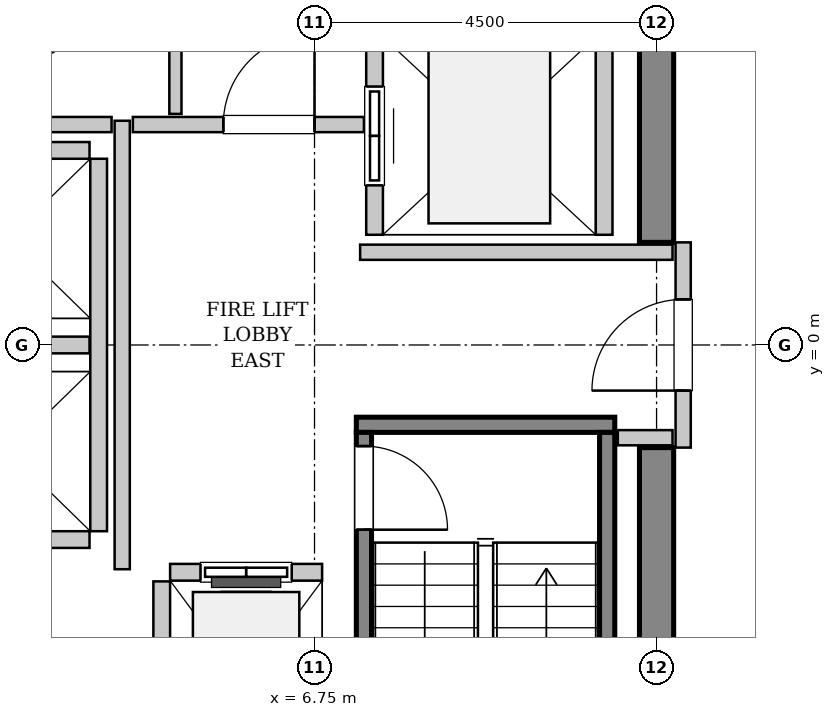
"""IFC4 building model, lengths in metres.
Left out: names, types, materials, properties, quantities, classifications, styles, units other than length and angle.
Written with IfcOpenShell. Run it as: python <this file> out.ifc"""

import sys

from ifc_helpers import new_model, si_unit, direction, frame, frame_2d, origin, place, context, subcontext, project, spatial, rectangle, extrude, source, transform, mapped, element, fill, save


model = new_model("IFC4")
c1 = context("Model", 3, precision=1e-05, world=origin(), true_north=direction((0.0, 1.0)))
c2 = subcontext(c1, "Body", "Model", "MODEL_VIEW")
j1 = project(units=[si_unit("LENGTHUNIT", "METRE"), si_unit("PLANEANGLEUNIT", "RADIAN")], contexts=[c1])
p1 = place(None, origin())
s1 = spatial("IfcSite", under=j1, at=p1, CompositionType="ELEMENT")
p2 = place(p1, origin())
s2 = spatial("IfcBuilding", under=s1, at=p2, CompositionType="ELEMENT")
p3 = place(p2, frame((0.0, 0.0, 206.6)))
s3 = spatial("IfcBuildingStorey", under=s2, at=p3, CompositionType="ELEMENT", Elevation=206.6)
m1 = source(origin(), c2, "Body", "SweptSolid", [
    extrude(rectangle(XDim=7.425, YDim=0.45, at=frame_2d((3.712, 0.0))), origin(), (0.0, 0.0, 1.0), 3.8),
])
for number, where, z_axis, x_axis in (
    (1, (11.25, -8.775, 0.0), (0.0, 0.0, 1.0), (0.0, 1.0, 0.0)),
    (2, (11.25, 1.35, 0.0), (0.0, 0.0, 1.0), (0.0, 1.0, 0.0)),
):
    element("IfcWall", number, at=place(p3, frame(where, z_axis=z_axis, x_axis=x_axis)), inside=s3, PredefinedType="SHEAR", context=c2, shape_type="MappedRepresentation", body=[
        mapped(m1, transform((0.0, 0.0, 0.0), x_axis=(1.0, 0.0, 0.0), y_axis=(0.0, 1.0, 0.0), z_axis=(0.0, 0.0, 1.0), scale=1.0)),
    ])
m2 = source(origin(), c2, "Body", "SweptSolid", [
    extrude(rectangle(XDim=3.4, YDim=0.2, at=frame_2d((1.7, 0.0))), origin(), (0.0, 0.0, 1.0), 3.8),
])
p4 = place(p3, frame((7.3, -1.05, 0.0), z_axis=(0.0, 0.0, 1.0), x_axis=(1.0, 0.0, 0.0)))
e3 = element("IfcWall", 3, at=p4, inside=s3, PredefinedType="SOLIDWALL", context=c2, shape_type="MappedRepresentation", body=[
    mapped(m2, transform((0.0, 0.0, 0.0), x_axis=(1.0, 0.0, 0.0), y_axis=(0.0, 1.0, 0.0), z_axis=(0.0, 0.0, 1.0), scale=1.0)),
])
m3 = source(origin(), c2, "Body", "SweptSolid", [
    extrude(rectangle(XDim=7.1, YDim=0.2, at=frame_2d((3.55, 0.0))), origin(), (0.0, 0.0, 1.0), 3.8),
])
p5 = place(p3, frame((7.4, -1.15, 0.0), z_axis=(0.0, 0.0, 1.0), x_axis=(0.0, -1.0, 0.0)))
e4 = element("IfcWall", 4, at=p5, inside=s3, PredefinedType="SOLIDWALL", context=c2, shape_type="MappedRepresentation", body=[
    mapped(m3, transform((0.0, 0.0, 0.0), x_axis=(1.0, 0.0, 0.0), y_axis=(0.0, 1.0, 0.0), z_axis=(0.0, 0.0, 1.0), scale=1.0)),
])
p6 = place(p5, frame((0.18, 0.0, 0.0)))
e5 = element("IfcOpeningElement", 5, at=p6, cuts=e4, PredefinedType="OPENING", context=c2, shape_type="SweptSolid", body=[
    extrude(rectangle(XDim=1.1, YDim=2.15, at=frame_2d((0.55, 1.075))), frame((0.0, 0.11, 0.0), z_axis=(0.0, -1.0, 0.0), x_axis=(1.0, 0.0, 0.0)), (0.0, 0.0, 1.0), 0.22),
])
p7 = place(p3, frame((10.6, -1.15, 0.0), z_axis=(0.0, 0.0, 1.0), x_axis=(0.0, -1.0, 0.0)))
e6 = element("IfcWall", 6, at=p7, inside=s3, PredefinedType="SOLIDWALL", context=c2, shape_type="MappedRepresentation", body=[
    mapped(m3, transform((0.0, 0.0, 0.0), x_axis=(1.0, 0.0, 0.0), y_axis=(0.0, 1.0, 0.0), z_axis=(0.0, 0.0, 1.0), scale=1.0)),
])
m4 = source(origin(), c2, "Body", "SweptSolid", [
    extrude(rectangle(XDim=2.0, YDim=0.22, at=frame_2d((1.0, 0.0))), origin(), (0.0, 0.0, 1.0), 3.535),
])
p8 = place(p3, frame((6.85, -2.99, 0.0), z_axis=(0.0, 0.0, 1.0), x_axis=(-1.0, 0.0, 0.0)))
e7 = element("IfcWall", 7, at=p8, inside=s3, PredefinedType="SOLIDWALL", context=c2, shape_type="MappedRepresentation", body=[
    mapped(m4, transform((0.0, 0.0, 0.0), x_axis=(1.0, 0.0, 0.0), y_axis=(0.0, 1.0, 0.0), z_axis=(0.0, 0.0, 1.0), scale=1.0)),
])
p9 = place(p8, frame((0.4, 0.0, 0.0)))
e8 = element("IfcOpeningElement", 8, at=p9, cuts=e7, PredefinedType="OPENING", context=c2, shape_type="SweptSolid", body=[
    extrude(rectangle(XDim=1.2, YDim=2.2, at=frame_2d((0.6, 1.1))), frame((0.0, 0.12, 0.0), z_axis=(0.0, -1.0, 0.0), x_axis=(1.0, 0.0, 0.0)), (0.0, 0.0, 1.0), 0.24),
])
m5 = source(origin(), c2, "Body", "SweptSolid", [
    extrude(rectangle(XDim=2.68, YDim=0.22, at=frame_2d((1.34, 0.0))), origin(), (0.0, 0.0, 1.0), 3.535),
])
p10 = place(p3, frame((4.74, -3.11, 0.0), z_axis=(0.0, 0.0, 1.0), x_axis=(0.0, -1.0, 0.0)))
e9 = element("IfcWall", 9, at=p10, inside=s3, PredefinedType="SOLIDWALL", context=c2, shape_type="MappedRepresentation", body=[
    mapped(m5, transform((0.0, 0.0, 0.0), x_axis=(1.0, 0.0, 0.0), y_axis=(0.0, 1.0, 0.0), z_axis=(0.0, 0.0, 1.0), scale=1.0)),
])
m6 = source(origin(), c2, "Body", "SweptSolid", [
    extrude(rectangle(XDim=5.45, YDim=0.22, at=frame_2d((2.725, 0.0))), origin(), (0.0, 0.0, 1.0), 3.535),
])
p11 = place(p3, frame((7.54, 6.9, 0.0), z_axis=(0.0, 0.0, 1.0), x_axis=(0.0, -1.0, 0.0)))
e10 = element("IfcWall", 10, at=p11, inside=s3, PredefinedType="SOLIDWALL", context=c2, shape_type="MappedRepresentation", body=[
    mapped(m6, transform((0.0, 0.0, 0.0), x_axis=(1.0, 0.0, 0.0), y_axis=(0.0, 1.0, 0.0), z_axis=(0.0, 0.0, 1.0), scale=1.0)),
])
p12 = place(p11, frame((3.5, 0.0, 0.0)))
e11 = element("IfcOpeningElement", 11, at=p12, cuts=e10, PredefinedType="OPENING", context=c2, shape_type="SweptSolid", body=[
    extrude(rectangle(XDim=1.3, YDim=2.3, at=frame_2d((0.65, 1.15))), frame((0.0, 0.12, 0.0), z_axis=(0.0, -1.0, 0.0), x_axis=(1.0, 0.0, 0.0)), (0.0, 0.0, 1.0), 0.24),
])
p13 = place(p11, frame((0.65, 0.0, 0.0)))
e12 = element("IfcOpeningElement", 12, at=p13, cuts=e10, PredefinedType="OPENING", context=c2, shape_type="SweptSolid", body=[
    extrude(rectangle(XDim=1.3, YDim=2.3, at=frame_2d((0.65, 1.15))), frame((0.0, 0.12, 0.0), z_axis=(0.0, -1.0, 0.0), x_axis=(1.0, 0.0, 0.0)), (0.0, 0.0, 1.0), 0.24),
])
p14 = place(p3, frame((10.56, 1.45, 0.0), z_axis=(0.0, 0.0, 1.0), x_axis=(0.0, 1.0, 0.0)))
e13 = element("IfcWall", 13, at=p14, inside=s3, PredefinedType="SOLIDWALL", context=c2, shape_type="MappedRepresentation", body=[
    mapped(m6, transform((0.0, 0.0, 0.0), x_axis=(1.0, 0.0, 0.0), y_axis=(0.0, 1.0, 0.0), z_axis=(0.0, 0.0, 1.0), scale=1.0)),
])
m7 = source(origin(), c2, "Body", "SweptSolid", [
    extrude(rectangle(XDim=4.9, YDim=0.22, at=frame_2d((2.45, 0.0))), origin(), (0.0, 0.0, 1.0), 3.535),
])
p15 = place(p3, frame((3.91, -2.45, 0.0), z_axis=(0.0, 0.0, 1.0), x_axis=(0.0, 1.0, 0.0)))
e14 = element("IfcWall", 14, at=p15, inside=s3, PredefinedType="SOLIDWALL", context=c2, shape_type="MappedRepresentation", body=[
    mapped(m7, transform((0.0, 0.0, 0.0), x_axis=(1.0, 0.0, 0.0), y_axis=(0.0, 1.0, 0.0), z_axis=(0.0, 0.0, 1.0), scale=1.0)),
])
m8 = source(origin(), c2, "Body", "SweptSolid", [
    extrude(rectangle(XDim=2.13, YDim=0.22, at=frame_2d((1.065, 0.0))), origin(), (0.0, 0.0, 1.0), 3.535),
])
for number, where, z_axis, x_axis in (
    (15, (1.66, -2.56, 0.0), (0.0, 0.0, 1.0), (1.0, 0.0, 0.0)),
    (16, (1.66, 0.0, 0.0), (0.0, 0.0, 1.0), (1.0, 0.0, 0.0)),
    (17, (3.79, 2.56, 0.0), (0.0, 0.0, 1.0), (-1.0, 0.0, 0.0)),
):
    element("IfcWall", number, at=place(p3, frame(where, z_axis=z_axis, x_axis=x_axis)), inside=s3, PredefinedType="SOLIDWALL", context=c2, shape_type="MappedRepresentation", body=[
        mapped(m8, transform((0.0, 0.0, 0.0), x_axis=(1.0, 0.0, 0.0), y_axis=(0.0, 1.0, 0.0), z_axis=(0.0, 0.0, 1.0), scale=1.0)),
    ])
m9 = source(origin(), c2, "Body", "SweptSolid", [
    extrude(rectangle(XDim=2.7, YDim=0.2, at=frame_2d((1.35, 0.0))), origin(), (0.0, 0.0, 1.0), 2.625),
])
p16 = place(p3, frame((11.6, -1.35, 0.0), z_axis=(0.0, 0.0, 1.0), x_axis=(0.0, 1.0, 0.0)))
e18 = element("IfcWall", 18, at=p16, inside=s3, PredefinedType="PARTITIONING", context=c2, shape_type="MappedRepresentation", body=[
    mapped(m9, transform((0.0, 0.0, 0.0), x_axis=(1.0, 0.0, 0.0), y_axis=(0.0, 1.0, 0.0), z_axis=(0.0, 0.0, 1.0), scale=1.0)),
])
p17 = place(p16, frame((0.75, 0.0, 0.0)))
e19 = element("IfcOpeningElement", 19, at=p17, cuts=e18, PredefinedType="OPENING", context=c2, shape_type="SweptSolid", body=[
    extrude(rectangle(XDim=1.2, YDim=2.15, at=frame_2d((0.6, 1.075))), frame((0.0, 0.11, 0.0), z_axis=(0.0, -1.0, 0.0), x_axis=(1.0, 0.0, 0.0)), (0.0, 0.0, 1.0), 0.22),
])
m10 = source(origin(), c2, "Body", "SweptSolid", [
    extrude(rectangle(XDim=5.9, YDim=0.2, at=frame_2d((2.95, 0.0))), origin(), (0.0, 0.0, 1.0), 3.535),
])
p18 = place(p3, frame((4.22, -2.95, 0.0), z_axis=(0.0, 0.0, 1.0), x_axis=(0.0, 1.0, 0.0)))
e20 = element("IfcWall", 20, at=p18, inside=s3, PredefinedType="PARTITIONING", context=c2, shape_type="MappedRepresentation", body=[
    mapped(m10, transform((0.0, 0.0, 0.0), x_axis=(1.0, 0.0, 0.0), y_axis=(0.0, 1.0, 0.0), z_axis=(0.0, 0.0, 1.0), scale=1.0)),
])
m11 = source(origin(), c2, "Body", "SweptSolid", [
    extrude(rectangle(XDim=2.52, YDim=0.2, at=frame_2d((1.26, 0.0))), origin(), (0.0, 0.0, 1.0), 3.535),
])
p19 = place(p3, frame((1.56, 2.9, 0.0), z_axis=(0.0, 0.0, 1.0), x_axis=(1.0, 0.0, 0.0)))
e21 = element("IfcWall", 21, at=p19, inside=s3, PredefinedType="PARTITIONING", context=c2, shape_type="MappedRepresentation", body=[
    mapped(m11, transform((0.0, 0.0, 0.0), x_axis=(1.0, 0.0, 0.0), y_axis=(0.0, 1.0, 0.0), z_axis=(0.0, 0.0, 1.0), scale=1.0)),
])
m12 = source(origin(), c2, "Body", "SweptSolid", [
    extrude(rectangle(XDim=3.04, YDim=0.2, at=frame_2d((1.52, 0.0))), origin(), (0.0, 0.0, 1.0), 3.535),
])
p20 = place(p3, frame((4.36, 2.9, 0.0), z_axis=(0.0, 0.0, 1.0), x_axis=(1.0, 0.0, 0.0)))
e22 = element("IfcWall", 22, at=p20, inside=s3, PredefinedType="PARTITIONING", context=c2, shape_type="MappedRepresentation", body=[
    mapped(m12, transform((0.0, 0.0, 0.0), x_axis=(1.0, 0.0, 0.0), y_axis=(0.0, 1.0, 0.0), z_axis=(0.0, 0.0, 1.0), scale=1.0)),
])
p21 = place(p20, frame((1.19, 0.0, 0.0)))
e23 = element("IfcOpeningElement", 23, at=p21, cuts=e22, PredefinedType="OPENING", context=c2, shape_type="SweptSolid", body=[
    extrude(rectangle(XDim=1.2, YDim=2.15, at=frame_2d((0.6, 1.075))), frame((0.0, 0.11, 0.0), z_axis=(0.0, -1.0, 0.0), x_axis=(1.0, 0.0, 0.0)), (0.0, 0.0, 1.0), 0.22),
])
m13 = source(origin(), c2, "Body", "SweptSolid", [
    extrude(rectangle(XDim=4.11, YDim=0.2, at=frame_2d((2.055, 0.0))), origin(), (0.0, 0.0, 1.0), 3.535),
])
p22 = place(p3, frame((7.35, 1.22, 0.0), z_axis=(0.0, 0.0, 1.0), x_axis=(1.0, 0.0, 0.0)))
e24 = element("IfcWall", 24, at=p22, inside=s3, PredefinedType="PARTITIONING", context=c2, shape_type="MappedRepresentation", body=[
    mapped(m13, transform((0.0, 0.0, 0.0), x_axis=(1.0, 0.0, 0.0), y_axis=(0.0, 1.0, 0.0), z_axis=(0.0, 0.0, 1.0), scale=1.0)),
])
m14 = source(origin(), c2, "Body", "SweptSolid", [
    extrude(rectangle(XDim=0.72, YDim=0.2, at=frame_2d((0.36, 0.0))), origin(), (0.0, 0.0, 1.0), 3.535),
])
p23 = place(p3, frame((10.74, -1.22, 0.0), z_axis=(0.0, 0.0, 1.0), x_axis=(1.0, 0.0, 0.0)))
e25 = element("IfcWall", 25, at=p23, inside=s3, PredefinedType="PARTITIONING", context=c2, shape_type="MappedRepresentation", body=[
    mapped(m14, transform((0.0, 0.0, 0.0), x_axis=(1.0, 0.0, 0.0), y_axis=(0.0, 1.0, 0.0), z_axis=(0.0, 0.0, 1.0), scale=1.0)),
])
m15 = source(origin(), c2, "Body", "SweptSolid", [
    extrude(rectangle(XDim=5.45, YDim=0.16, at=frame_2d((2.725, 0.0))), origin(), (0.0, 0.0, 1.0), 3.535),
])
p24 = place(p3, frame((4.92, 3.04, 0.0), z_axis=(0.0, 0.0, 1.0), x_axis=(0.0, 1.0, 0.0)))
e26 = element("IfcWall", 26, at=p24, inside=s3, PredefinedType="PARTITIONING", context=c2, shape_type="MappedRepresentation", body=[
    mapped(m15, transform((0.0, 0.0, 0.0), x_axis=(1.0, 0.0, 0.0), y_axis=(0.0, 1.0, 0.0), z_axis=(0.0, 0.0, 1.0), scale=1.0)),
])
m16 = source(origin(), c2, "Body", "SweptSolid", [
    extrude(rectangle(XDim=1.1, YDim=2.15, at=frame_2d((0.55, 1.075))), frame((0.0, 0.025, 0.0), z_axis=(0.0, -1.0, 0.0), x_axis=(1.0, 0.0, 0.0)), (0.0, 0.0, 1.0), 0.05),
])
p25 = place(p6, origin())
e27 = element("IfcDoor", 27, at=p25, inside=s3, OperationType="SINGLE_SWING_RIGHT", PredefinedType="DOOR", context=c2, shape_type="MappedRepresentation", body=[
    mapped(m16, transform((0.0, 0.0, 0.0), x_axis=(1.0, 0.0, 0.0), y_axis=(0.0, 1.0, 0.0), z_axis=(0.0, 0.0, 1.0), scale=1.0)),
])
fill(e5, e27)
m17 = source(origin(), c2, "Body", "SweptSolid", [
    extrude(rectangle(XDim=1.2, YDim=2.2, at=frame_2d((0.6, 1.1))), frame((0.0, 0.025, 0.0), z_axis=(0.0, -1.0, 0.0), x_axis=(1.0, 0.0, 0.0)), (0.0, 0.0, 1.0), 0.05),
])
p26 = place(p9, origin())
e28 = element("IfcDoor", 28, at=p26, inside=s3, OperationType="SLIDING_TO_LEFT", PredefinedType="DOOR", context=c2, shape_type="MappedRepresentation", body=[
    mapped(m17, transform((0.0, 0.0, 0.0), x_axis=(1.0, 0.0, 0.0), y_axis=(0.0, 1.0, 0.0), z_axis=(0.0, 0.0, 1.0), scale=1.0)),
])
fill(e8, e28)
m18 = source(origin(), c2, "Body", "SweptSolid", [
    extrude(rectangle(XDim=1.3, YDim=2.3, at=frame_2d((0.65, 1.15))), frame((0.0, 0.025, 0.0), z_axis=(0.0, -1.0, 0.0), x_axis=(1.0, 0.0, 0.0)), (0.0, 0.0, 1.0), 0.05),
])
p27 = place(p12, origin())
e29 = element("IfcDoor", 29, at=p27, inside=s3, OperationType="SLIDING_TO_RIGHT", PredefinedType="DOOR", context=c2, shape_type="MappedRepresentation", body=[
    mapped(m18, transform((0.0, 0.0, 0.0), x_axis=(1.0, 0.0, 0.0), y_axis=(0.0, 1.0, 0.0), z_axis=(0.0, 0.0, 1.0), scale=1.0)),
])
fill(e11, e29)
m19 = source(origin(), c2, "Body", "SweptSolid", [
    extrude(rectangle(XDim=1.2, YDim=2.15, at=frame_2d((0.6, 1.075))), frame((0.0, 0.025, 0.0), z_axis=(0.0, -1.0, 0.0), x_axis=(1.0, 0.0, 0.0)), (0.0, 0.0, 1.0), 0.05),
])
p28 = place(p17, origin())
e30 = element("IfcDoor", 30, at=p28, inside=s3, OperationType="SINGLE_SWING_LEFT", PredefinedType="DOOR", context=c2, shape_type="MappedRepresentation", body=[
    mapped(m19, transform((0.0, 0.0, 0.0), x_axis=(1.0, 0.0, 0.0), y_axis=(0.0, 1.0, 0.0), z_axis=(0.0, 0.0, 1.0), scale=1.0)),
])
fill(e19, e30)
p29 = place(p21, origin())
e31 = element("IfcDoor", 31, at=p29, inside=s3, OperationType="SINGLE_SWING_RIGHT", PredefinedType="DOOR", context=c2, shape_type="MappedRepresentation", body=[
    mapped(m19, transform((0.0, 0.0, 0.0), x_axis=(1.0, 0.0, 0.0), y_axis=(0.0, 1.0, 0.0), z_axis=(0.0, 0.0, 1.0), scale=1.0)),
])
fill(e23, e31)
save(model, sys.argv[1])
